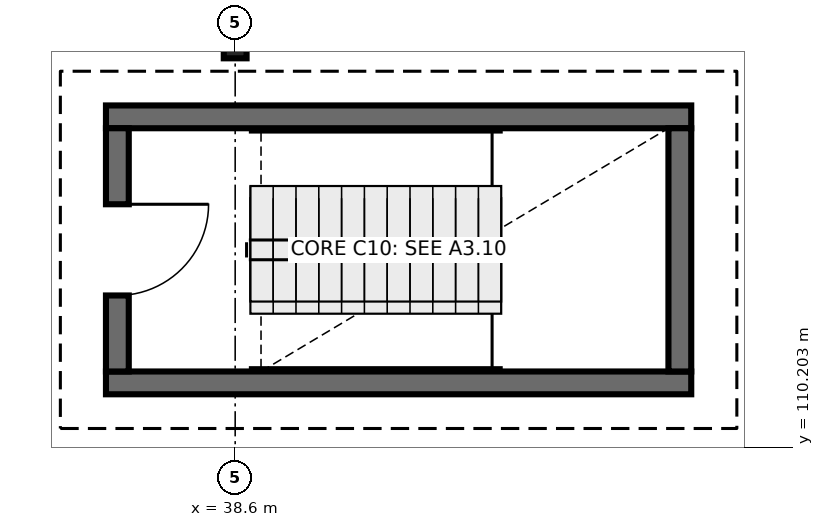
"""IFC4 building model, lengths in metres.
Left out: names, types, materials, properties, quantities, classifications, styles, units other than length and angle.
Written with IfcOpenShell. Run it as: python <this file> out.ifc"""

import sys

from ifc_helpers import new_model, si_unit, direction, frame, frame_2d, origin, origin_2d, place, context, subcontext, project, spatial, rectangle, i_section, extrude, element, fill, save


model = new_model("IFC4")
c1 = context("Model", 3, precision=1e-05, world=origin(), true_north=direction((0.0, 1.0)))
c2 = subcontext(c1, "Body", "Model", "MODEL_VIEW")
j1 = project(units=[si_unit("LENGTHUNIT", "METRE"), si_unit("PLANEANGLEUNIT", "RADIAN")], contexts=[c1])
p1 = place(None, origin())
s1 = spatial("IfcSite", under=j1, at=p1, CompositionType="ELEMENT")
p2 = place(p1, origin())
s2 = spatial("IfcBuilding", under=s1, at=p2, CompositionType="ELEMENT")
p3 = place(p2, frame((0.0, 0.0, 18.3)))
s3 = spatial("IfcBuildingStorey", under=s2, at=p3, CompositionType="ELEMENT", Elevation=18.3)
p4 = place(p3, frame((38.6, 115.5, 0.0), z_axis=(0.0, 0.0, 1.0), x_axis=(1.0, 0.0, 0.0)))
e1 = element("IfcColumn", 1, at=p4, inside=s3, PredefinedType="COLUMN", context=c2, shape_type="SweptSolid", body=[
    extrude(i_section(OverallWidth=0.3, OverallDepth=0.36, WebThickness=0.012, FlangeThickness=0.022, FilletRadius=0.027, at=origin_2d()), origin(), (0.0, 0.0, 1.0), 4.5),
])
for number, where, z_axis, x_axis in (
    (2, (36.9, 111.05, 0.0), (0.0, 0.0, 1.0), (1.0, 0.0, 0.0)),
    (3, (44.6, 114.55, 0.0), (0.0, 0.0, 1.0), (-1.0, 0.0, 0.0)),
):
    element("IfcWall", number, at=place(p3, frame(where, z_axis=z_axis, x_axis=x_axis)), inside=s3, PredefinedType="SHEAR", context=c2, shape_type="SweptSolid", body=[
        extrude(rectangle(XDim=7.7, YDim=0.3, at=frame_2d((3.85, 0.0))), origin(), (0.0, 0.0, 1.0), 4.5),
    ])
p5 = place(p3, frame((37.05, 114.4, 0.0), z_axis=(0.0, 0.0, 1.0), x_axis=(0.0, -1.0, 0.0)))
e4 = element("IfcWall", 4, at=p5, inside=s3, PredefinedType="SHEAR", context=c2, shape_type="SweptSolid", body=[
    extrude(rectangle(XDim=3.2, YDim=0.3, at=frame_2d((1.6, 0.0))), origin(), (0.0, 0.0, 1.0), 4.5),
])
p6 = place(p5, frame((1.0, 0.0, 0.0)))
e5 = element("IfcOpeningElement", 5, at=p6, cuts=e4, PredefinedType="OPENING", context=c2, shape_type="SweptSolid", body=[
    extrude(rectangle(XDim=1.2, YDim=2.15, at=frame_2d((0.6, 1.075))), frame((0.0, 0.16, 0.0), z_axis=(0.0, -1.0, 0.0), x_axis=(1.0, 0.0, 0.0)), (0.0, 0.0, 1.0), 0.32),
])
p7 = place(p3, frame((44.45, 111.2, 0.0), z_axis=(0.0, 0.0, 1.0), x_axis=(0.0, 1.0, 0.0)))
e6 = element("IfcWall", 6, at=p7, inside=s3, PredefinedType="SHEAR", context=c2, shape_type="SweptSolid", body=[
    extrude(rectangle(XDim=3.2, YDim=0.3, at=frame_2d((1.6, 0.0))), origin(), (0.0, 0.0, 1.0), 4.5),
])
p8 = place(p6, origin())
e7 = element("IfcDoor", 7, at=p8, inside=s3, OperationType="SINGLE_SWING_LEFT", PredefinedType="DOOR", context=c2, shape_type="SweptSolid", body=[
    extrude(rectangle(XDim=1.2, YDim=2.15, at=frame_2d((0.6, 1.075))), frame((0.0, 0.025, 0.0), z_axis=(0.0, -1.0, 0.0), x_axis=(1.0, 0.0, 0.0)), (0.0, 0.0, 1.0), 0.05),
])
fill(e5, e7)
save(model, sys.argv[1])
